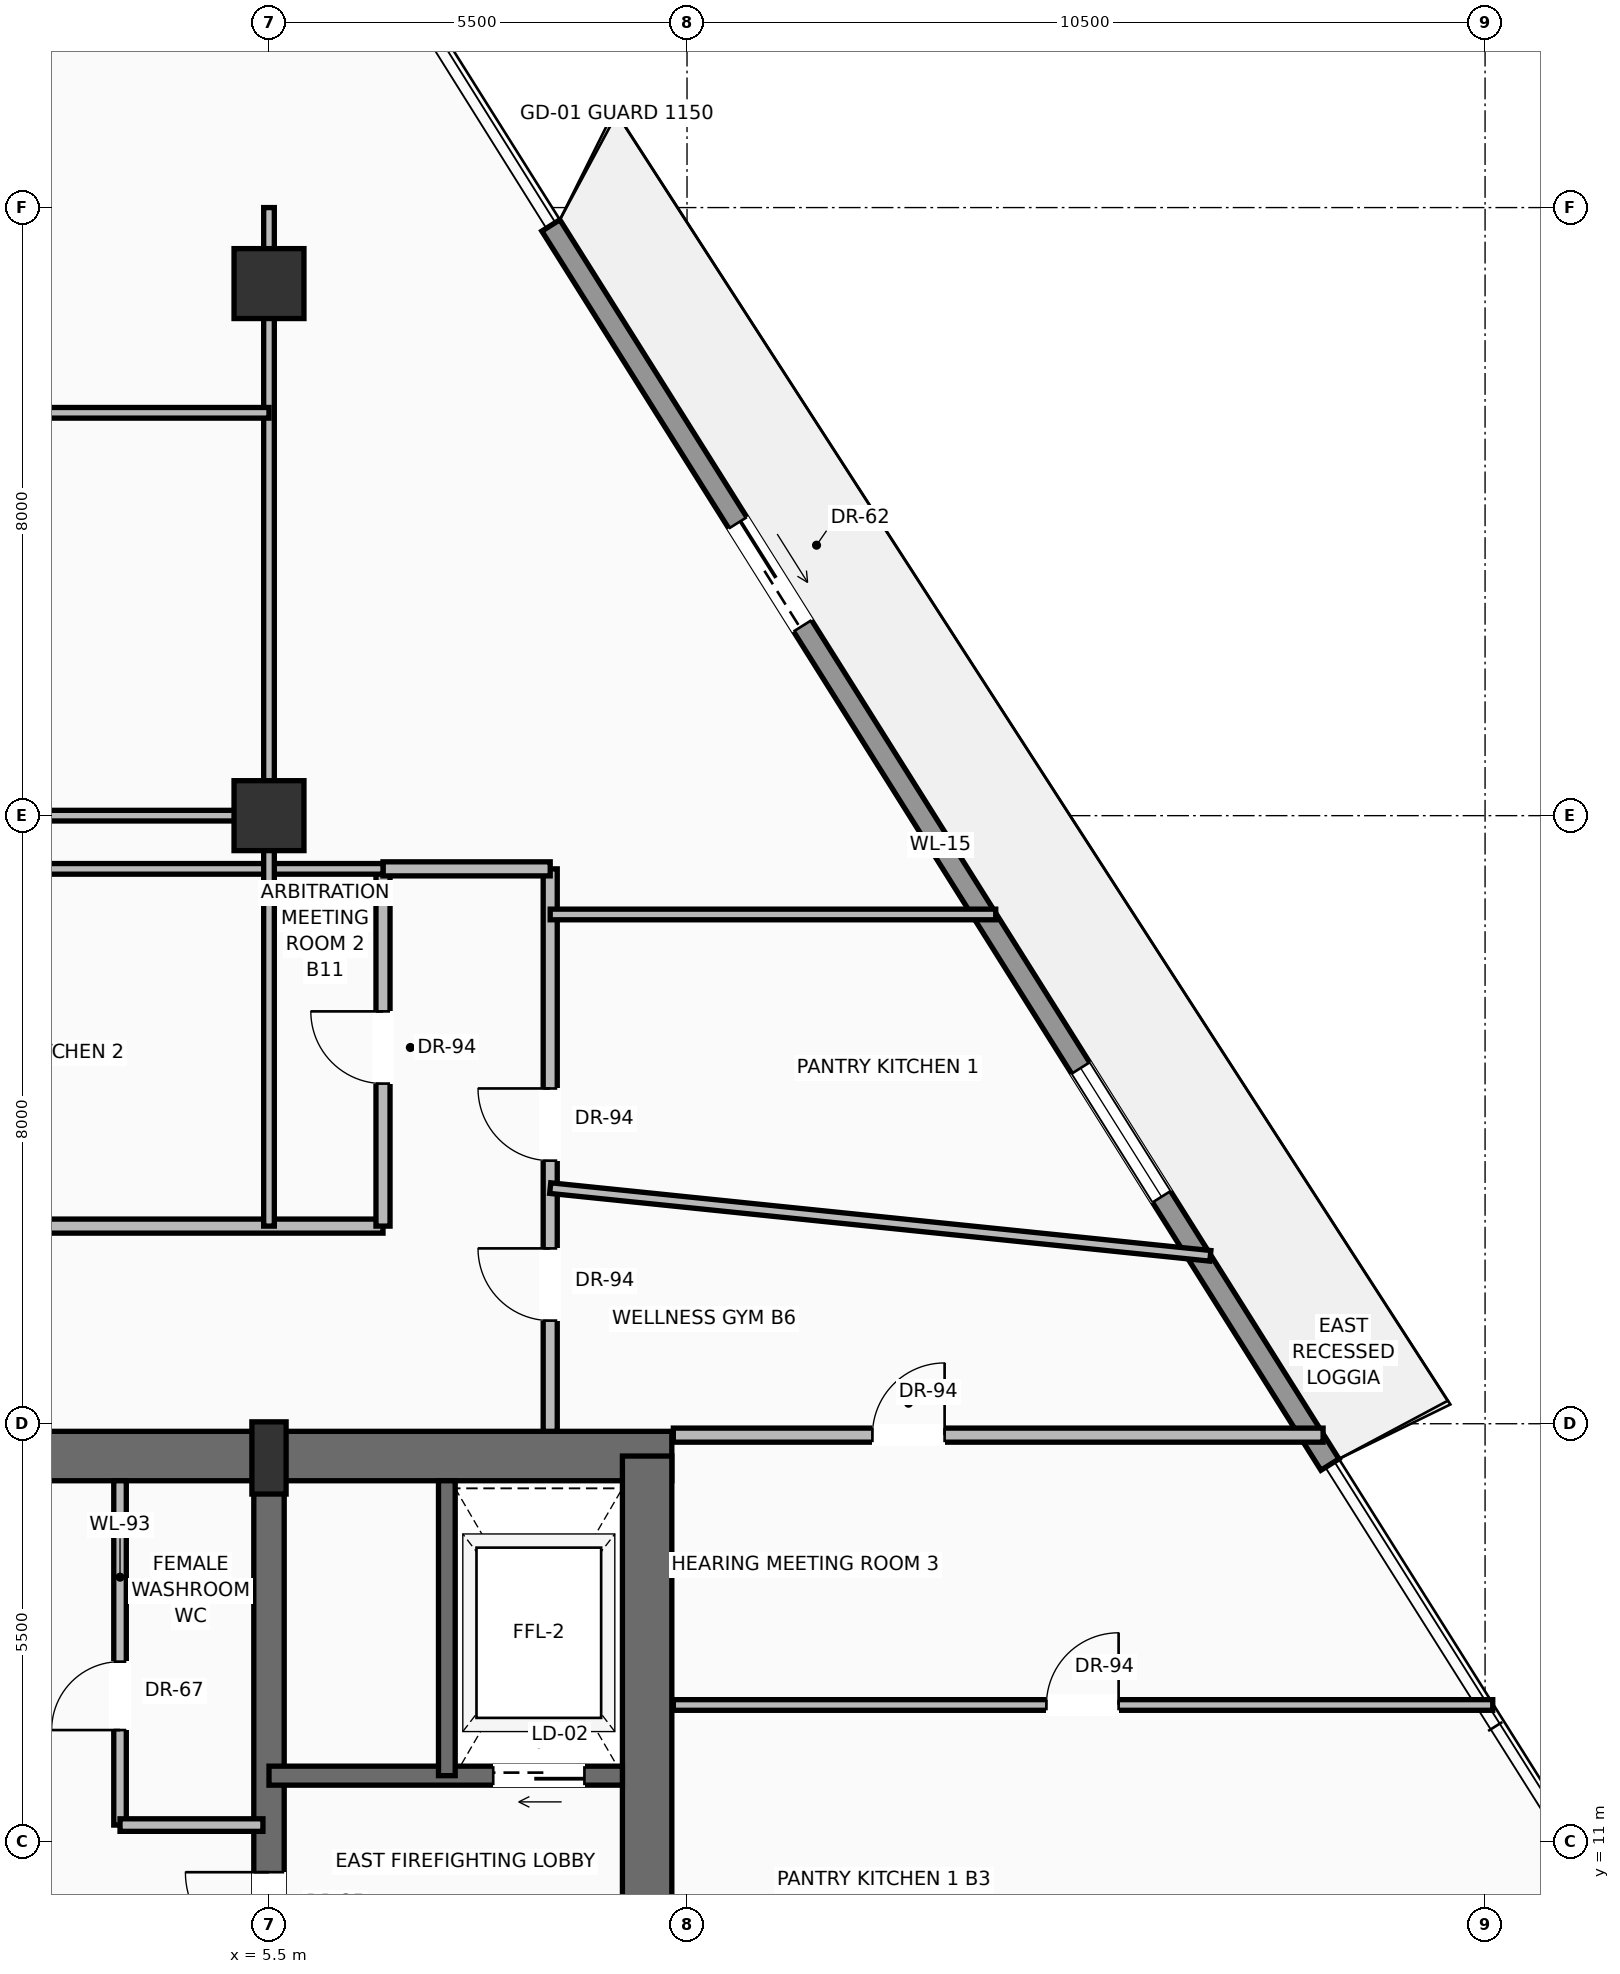
"""IFC4 building model, lengths in metres.
Left out: names, types, materials, properties, quantities, classifications, styles, units other than length and angle.
Written with IfcOpenShell. Run it as: python <this file> out.ifc"""

import sys

from ifc_helpers import new_model, si_unit, direction, frame, frame_2d, origin, origin_2d, place, context, subcontext, project, spatial, rectangle, extrude, source, transform, mapped, element, fill, save


model = new_model("IFC4")
c1 = context("Model", 3, precision=1e-05, world=origin(), true_north=direction((0.0, 1.0)))
c2 = subcontext(c1, "Body", "Model", "MODEL_VIEW")
j1 = project(units=[si_unit("LENGTHUNIT", "METRE"), si_unit("PLANEANGLEUNIT", "RADIAN")], contexts=[c1])
p1 = place(None, origin())
s1 = spatial("IfcSite", under=j1, at=p1, CompositionType="ELEMENT")
p2 = place(p1, origin())
s2 = spatial("IfcBuilding", under=s1, at=p2, CompositionType="ELEMENT")
p3 = place(p2, frame((0.0, 0.0, 211.7)))
s3 = spatial("IfcBuildingStorey", under=s2, at=p3, CompositionType="ELEMENT", Elevation=211.7)
p4 = place(p3, frame((-10.8, 16.075, 0.0), z_axis=(0.0, 0.0, 1.0), x_axis=(1.0, 0.0, 0.0)))
e1 = element("IfcWall", 1, at=p4, inside=s3, PredefinedType="SHEAR", context=c2, shape_type="SweptSolid", body=[
    extrude(rectangle(XDim=21.6, YDim=0.65, at=frame_2d((10.8, 0.0))), origin(), (0.0, 0.0, 1.0), 3.42),
])
p5 = place(p4, frame((3.37, 0.0, 0.0)))
e2 = element("IfcOpeningElement", 2, at=p5, cuts=e1, PredefinedType="OPENING", context=c2, shape_type="SweptSolid", body=[
    extrude(rectangle(XDim=1.3, YDim=2.3, at=frame_2d((0.65, 1.15))), frame((0.0, 0.335, 0.0), z_axis=(0.0, -1.0, 0.0), x_axis=(1.0, 0.0, 0.0)), (0.0, 0.0, 1.0), 0.67),
])
p6 = place(p4, frame((9.8, 0.0, 0.0)))
e3 = element("IfcOpeningElement", 3, at=p6, cuts=e1, PredefinedType="OPENING", context=c2, shape_type="SweptSolid", body=[
    extrude(rectangle(XDim=2.0, YDim=2.4, at=frame_2d((1.0, 1.2))), frame((0.0, 0.335, 0.0), z_axis=(0.0, -1.0, 0.0), x_axis=(1.0, 0.0, 0.0)), (0.0, 0.0, 1.0), 0.67),
])
p7 = place(p3, frame((10.475, 0.525, 0.0), z_axis=(0.0, 0.0, 1.0), x_axis=(0.0, 1.0, 0.0)))
e4 = element("IfcWall", 4, at=p7, inside=s3, PredefinedType="SHEAR", context=c2, shape_type="SweptSolid", body=[
    extrude(rectangle(XDim=15.55, YDim=0.65, at=frame_2d((7.775, 0.0))), origin(), (0.0, 0.0, 1.0), 3.42),
])
p8 = place(p3, frame((5.5, 0.525, 0.0), z_axis=(0.0, 0.0, 1.0), x_axis=(0.0, 1.0, 0.0)))
e5 = element("IfcWall", 5, at=p8, inside=s3, PredefinedType="SHEAR", context=c2, shape_type="SweptSolid", body=[
    extrude(rectangle(XDim=15.55, YDim=0.4, at=frame_2d((7.775, 0.0))), origin(), (0.0, 0.0, 1.0), 3.42),
])
p9 = place(p8, frame((8.975, 0.0, 0.0)))
e6 = element("IfcOpeningElement", 6, at=p9, cuts=e5, PredefinedType="OPENING", context=c2, shape_type="SweptSolid", body=[
    extrude(rectangle(XDim=1.1, YDim=2.2, at=frame_2d((0.55, 1.1))), frame((0.0, 0.21, 0.0), z_axis=(0.0, -1.0, 0.0), x_axis=(1.0, 0.0, 0.0)), (0.0, 0.0, 1.0), 0.42),
])
m1 = source(origin(), c2, "Body", "SweptSolid", [
    extrude(rectangle(XDim=0.45, YDim=0.95, at=origin_2d()), origin(), (0.0, 0.0, 1.0), 3.7),
])
p10 = place(p3, frame((5.5, 16.05, 0.0), z_axis=(0.0, 0.0, 1.0), x_axis=(1.0, 0.0, 0.0)))
e7 = element("IfcColumn", 7, at=p10, inside=s3, PredefinedType="PILASTER", context=c2, shape_type="MappedRepresentation", body=[
    mapped(m1, transform((0.0, 0.0, 0.0), scale=1.0)),
])
m2 = source(origin(), c2, "Body", "SweptSolid", [
    extrude(rectangle(XDim=0.92, YDim=0.92, at=origin_2d()), origin(), (0.0, 0.0, 1.0), 3.7),
])
for number, where, z_axis, x_axis in (
    (8, (5.5, 24.5, 0.0), (0.0, 0.0, 1.0), (1.0, 0.0, 0.0)),
    (9, (5.5, 31.5, 0.0), (0.0, 0.0, 1.0), (1.0, 0.0, 0.0)),
):
    element("IfcColumn", number, at=place(p3, frame(where, z_axis=z_axis, x_axis=x_axis)), inside=s3, PredefinedType="COLUMN", context=c2, shape_type="MappedRepresentation", body=[
        mapped(m2, transform((0.0, 0.0, 0.0), scale=1.0)),
    ])
p11 = place(p3, frame((9.208, 32.265, 0.0), z_axis=(0.0, 0.0, 1.0), x_axis=(0.532287601055, -0.84656358873, 0.0)))
e10 = element("IfcWall", 10, at=p11, inside=s3, PredefinedType="SOLIDWALL", context=c2, shape_type="SweptSolid", body=[
    extrude(rectangle(XDim=19.257, YDim=0.28, at=frame_2d((9.628, 0.0))), origin(), (0.0, 0.0, 1.0), 3.0),
])
p12 = place(p11, frame((4.622, 0.0, 0.0)))
e11 = element("IfcOpeningElement", 11, at=p12, cuts=e10, PredefinedType="OPENING", context=c2, shape_type="SweptSolid", body=[
    extrude(rectangle(XDim=1.6, YDim=2.35, at=frame_2d((0.8, 1.175))), frame((0.0, 0.15, 0.0), z_axis=(0.0, -1.0, 0.0), x_axis=(1.0, 0.0, 0.0)), (0.0, 0.0, 1.0), 0.3),
])
p13 = place(p11, frame((13.095, 0.0, 0.9)))
e12 = element("IfcOpeningElement", 12, at=p13, cuts=e10, PredefinedType="OPENING", context=c2, shape_type="SweptSolid", body=[
    extrude(rectangle(XDim=2.0, YDim=1.85, at=frame_2d((1.0, 0.925))), frame((0.0, 0.15, 0.0), z_axis=(0.0, -1.0, 0.0), x_axis=(1.0, 0.0, 0.0)), (0.0, 0.0, 1.0), 0.3),
])
p14 = place(p3, frame((10.15, 11.87, 0.0), z_axis=(0.0, 0.0, 1.0), x_axis=(-1.0, 0.0, 0.0)))
e13 = element("IfcWall", 13, at=p14, inside=s3, PredefinedType="SOLIDWALL", context=c2, shape_type="SweptSolid", body=[
    extrude(rectangle(XDim=4.65, YDim=0.25, at=frame_2d((2.325, 0.0))), origin(), (0.0, 0.0, 1.0), 3.42),
])
p15 = place(p14, frame((0.5, 0.0, 0.0)))
e14 = element("IfcOpeningElement", 14, at=p15, cuts=e13, PredefinedType="OPENING", context=c2, shape_type="SweptSolid", body=[
    extrude(rectangle(XDim=1.2, YDim=2.25, at=frame_2d((0.6, 1.125))), frame((0.0, 0.135, 0.0), z_axis=(0.0, -1.0, 0.0), x_axis=(1.0, 0.0, 0.0)), (0.0, 0.0, 1.0), 0.27),
])
p16 = place(p3, frame((7.84, 11.87, 0.0), z_axis=(0.0, 0.0, 1.0), x_axis=(0.0, 1.0, 0.0)))
e15 = element("IfcWall", 15, at=p16, inside=s3, PredefinedType="SOLIDWALL", context=c2, shape_type="SweptSolid", body=[
    extrude(rectangle(XDim=3.88, YDim=0.22, at=frame_2d((1.94, 0.0))), origin(), (0.0, 0.0, 1.0), 3.42),
])
p17 = place(p3, frame((3.54, 11.22, 0.0), z_axis=(0.0, 0.0, 1.0), x_axis=(0.0, 1.0, 0.0)))
e16 = element("IfcWall", 16, at=p17, inside=s3, PredefinedType="PARTITIONING", context=c2, shape_type="SweptSolid", body=[
    extrude(rectangle(XDim=4.53, YDim=0.165, at=frame_2d((2.265, 0.0))), origin(), (0.0, 0.0, 1.0), 3.412),
])
p18 = place(p17, frame((1.25, 0.0, 0.0)))
e17 = element("IfcOpeningElement", 17, at=p18, cuts=e16, PredefinedType="OPENING", context=c2, shape_type="SweptSolid", body=[
    extrude(rectangle(XDim=0.9, YDim=2.1, at=frame_2d((0.45, 1.05))), frame((0.0, 0.093, 0.0), z_axis=(0.0, -1.0, 0.0), x_axis=(1.0, 0.0, 0.0)), (0.0, 0.0, 1.0), 0.185),
])
p19 = place(p3, frame((3.54, 11.22, 0.0), z_axis=(0.0, 0.0, 1.0), x_axis=(1.0, 0.0, 0.0)))
e18 = element("IfcWall", 18, at=p19, inside=s3, PredefinedType="PARTITIONING", context=c2, shape_type="SweptSolid", body=[
    extrude(rectangle(XDim=1.88, YDim=0.165, at=frame_2d((0.94, 0.0))), origin(), (0.0, 0.0, 1.0), 3.412),
])
p20 = place(p3, frame((-7.0, 19.1, 0.0), z_axis=(0.0, 0.0, 1.0), x_axis=(1.0, 0.0, 0.0)))
e19 = element("IfcWall", 19, at=p20, inside=s3, PredefinedType="PARTITIONING", context=c2, shape_type="SweptSolid", body=[
    extrude(rectangle(XDim=14.0, YDim=0.185, at=frame_2d((7.0, 0.0))), origin(), (0.0, 0.0, 1.0), 2.796),
])
p21 = place(p20, frame((6.525, 0.0, 0.0)))
e20 = element("IfcOpeningElement", 20, at=p21, cuts=e19, PredefinedType="OPENING", context=c2, shape_type="SweptSolid", body=[
    extrude(rectangle(XDim=0.95, YDim=2.2, at=frame_2d((0.475, 1.1))), frame((0.0, 0.103, 0.0), z_axis=(0.0, -1.0, 0.0), x_axis=(1.0, 0.0, 0.0)), (0.0, 0.0, 1.0), 0.205),
])
p22 = place(p3, frame((7.0, 19.1, 0.0), z_axis=(0.0, 0.0, 1.0), x_axis=(0.0, 1.0, 0.0)))
e21 = element("IfcWall", 21, at=p22, inside=s3, PredefinedType="PARTITIONING", context=c2, shape_type="SweptSolid", body=[
    extrude(rectangle(XDim=4.7, YDim=0.185, at=frame_2d((2.35, 0.0))), origin(), (0.0, 0.0, 1.0), 3.412),
])
p23 = place(p22, frame((1.875, 0.0, 0.0)))
e22 = element("IfcOpeningElement", 22, at=p23, cuts=e21, PredefinedType="OPENING", context=c2, shape_type="SweptSolid", body=[
    extrude(rectangle(XDim=0.95, YDim=2.2, at=frame_2d((0.475, 1.1))), frame((0.0, 0.103, 0.0), z_axis=(0.0, -1.0, 0.0), x_axis=(1.0, 0.0, 0.0)), (0.0, 0.0, 1.0), 0.205),
])
p24 = place(p3, frame((9.2, 16.4, 0.0), z_axis=(0.0, 0.0, 1.0), x_axis=(0.0, 1.0, 0.0)))
e23 = element("IfcWall", 23, at=p24, inside=s3, PredefinedType="PARTITIONING", context=c2, shape_type="SweptSolid", body=[
    extrude(rectangle(XDim=7.4, YDim=0.185, at=frame_2d((3.7, 0.0))), origin(), (0.0, 0.0, 1.0), 3.412),
])
p25 = place(p24, frame((3.561, 0.0, 0.0)))
e24 = element("IfcOpeningElement", 24, at=p25, cuts=e23, PredefinedType="OPENING", context=c2, shape_type="SweptSolid", body=[
    extrude(rectangle(XDim=0.95, YDim=2.2, at=frame_2d((0.475, 1.1))), frame((0.0, 0.103, 0.0), z_axis=(0.0, -1.0, 0.0), x_axis=(1.0, 0.0, 0.0)), (0.0, 0.0, 1.0), 0.205),
])
p26 = place(p24, frame((1.457, 0.0, 0.0)))
e25 = element("IfcOpeningElement", 25, at=p26, cuts=e23, PredefinedType="OPENING", context=c2, shape_type="SweptSolid", body=[
    extrude(rectangle(XDim=0.95, YDim=2.2, at=frame_2d((0.475, 1.1))), frame((0.0, 0.103, 0.0), z_axis=(0.0, -1.0, 0.0), x_axis=(1.0, 0.0, 0.0)), (0.0, 0.0, 1.0), 0.205),
])
p27 = place(p3, frame((7.0, 23.8, 0.0), z_axis=(0.0, 0.0, 1.0), x_axis=(1.0, 0.0, 0.0)))
e26 = element("IfcWall", 26, at=p27, inside=s3, PredefinedType="PARTITIONING", context=c2, shape_type="SweptSolid", body=[
    extrude(rectangle(XDim=2.2, YDim=0.185, at=frame_2d((1.1, 0.0))), origin(), (0.0, 0.0, 1.0), 3.412),
])
p28 = place(p3, frame((10.82, 16.35, 0.0), z_axis=(0.0, 0.0, 1.0), x_axis=(1.0, 0.0, 0.0)))
e27 = element("IfcWall", 27, at=p28, inside=s3, PredefinedType="PARTITIONING", context=c2, shape_type="SweptSolid", body=[
    extrude(rectangle(XDim=8.549, YDim=0.185, at=frame_2d((4.274, 0.0))), origin(), (0.0, 0.0, 1.0), 3.412),
])
p29 = place(p28, frame((2.619, 0.0, 0.0)))
e28 = element("IfcOpeningElement", 28, at=p29, cuts=e27, PredefinedType="OPENING", context=c2, shape_type="SweptSolid", body=[
    extrude(rectangle(XDim=0.95, YDim=2.2, at=frame_2d((0.475, 1.1))), frame((0.0, 0.103, 0.0), z_axis=(0.0, -1.0, 0.0), x_axis=(1.0, 0.0, 0.0)), (0.0, 0.0, 1.0), 0.205),
])
p30 = place(p3, frame((-7.0, 23.8, 0.0), z_axis=(0.0, 0.0, 1.0), x_axis=(1.0, 0.0, 0.0)))
e29 = element("IfcWall", 29, at=p30, inside=s3, PredefinedType="PARTITIONING", context=c2, shape_type="SweptSolid", body=[
    extrude(rectangle(XDim=14.0, YDim=0.14, at=frame_2d((7.0, 0.0))), origin(), (0.0, 0.0, 1.0), 3.412),
])
p31 = place(p3, frame((5.5, 19.1, 0.0), z_axis=(0.0, 0.0, 1.0), x_axis=(0.0, 1.0, 0.0)))
e30 = element("IfcWall", 30, at=p31, inside=s3, PredefinedType="PARTITIONING", context=c2, shape_type="SweptSolid", body=[
    extrude(rectangle(XDim=13.4, YDim=0.14, at=frame_2d((6.7, 0.0))), origin(), (0.0, 0.0, 1.0), 2.796),
])
p32 = place(p3, frame((-5.5, 24.5, 0.0), z_axis=(0.0, 0.0, 1.0), x_axis=(1.0, 0.0, 0.0)))
e31 = element("IfcWall", 31, at=p32, inside=s3, PredefinedType="PARTITIONING", context=c2, shape_type="SweptSolid", body=[
    extrude(rectangle(XDim=11.0, YDim=0.14, at=frame_2d((5.5, 0.0))), origin(), (0.0, 0.0, 1.0), 2.796),
])
p33 = place(p3, frame((-5.5, 29.8, 0.0), z_axis=(0.0, 0.0, 1.0), x_axis=(1.0, 0.0, 0.0)))
e32 = element("IfcWall", 32, at=p33, inside=s3, PredefinedType="PARTITIONING", context=c2, shape_type="SweptSolid", body=[
    extrude(rectangle(XDim=11.0, YDim=0.14, at=frame_2d((5.5, 0.0))), origin(), (0.0, 0.0, 1.0), 3.412),
])
p34 = place(p3, frame((10.82, 12.8, 0.0), z_axis=(0.0, 0.0, 1.0), x_axis=(1.0, 0.0, 0.0)))
e33 = element("IfcWall", 33, at=p34, inside=s3, PredefinedType="PARTITIONING", context=c2, shape_type="SweptSolid", body=[
    extrude(rectangle(XDim=10.781, YDim=0.14, at=frame_2d((5.391, 0.0))), origin(), (0.0, 0.0, 1.0), 3.412),
])
p35 = place(p34, frame((4.908, 0.0, 0.0)))
e34 = element("IfcOpeningElement", 34, at=p35, cuts=e33, PredefinedType="OPENING", context=c2, shape_type="SweptSolid", body=[
    extrude(rectangle(XDim=0.95, YDim=2.2, at=frame_2d((0.475, 1.1))), frame((0.0, 0.08, 0.0), z_axis=(0.0, -1.0, 0.0), x_axis=(1.0, 0.0, 0.0)), (0.0, 0.0, 1.0), 0.16),
])
p36 = place(p3, frame((9.2, 19.6, 0.0), z_axis=(0.0, 0.0, 1.0), x_axis=(0.994778090634, -0.102061503002, 0.0)))
e35 = element("IfcWall", 35, at=p36, inside=s3, PredefinedType="PARTITIONING", context=c2, shape_type="SweptSolid", body=[
    extrude(rectangle(XDim=8.731, YDim=0.14, at=frame_2d((4.366, 0.0))), origin(), (0.0, 0.0, 1.0), 2.999),
])
p37 = place(p3, frame((9.2, 23.2, 0.0), z_axis=(0.0, 0.0, 1.0), x_axis=(1.0, 0.0, 0.0)))
e36 = element("IfcWall", 36, at=p37, inside=s3, PredefinedType="PARTITIONING", context=c2, shape_type="SweptSolid", body=[
    extrude(rectangle(XDim=5.862, YDim=0.14, at=frame_2d((2.931, 0.0))), origin(), (0.0, 0.0, 1.0), 3.412),
])
m3 = source(origin(), c2, "Body", "SweptSolid", [
    extrude(rectangle(XDim=1.6, YDim=2.35, at=frame_2d((0.8, 1.175))), frame((0.0, 0.025, 0.0), z_axis=(0.0, -1.0, 0.0), x_axis=(1.0, 0.0, 0.0)), (0.0, 0.0, 1.0), 0.05),
])
p38 = place(p12, origin())
e37 = element("IfcDoor", 37, at=p38, inside=s3, OperationType="SLIDING_TO_RIGHT", PredefinedType="DOOR", context=c2, shape_type="MappedRepresentation", body=[
    mapped(m3, transform((0.0, 0.0, 0.0), scale=1.0)),
])
fill(e11, e37)
m4 = source(origin(), c2, "Body", "SweptSolid", [
    extrude(rectangle(XDim=2.0, YDim=1.85, at=frame_2d((1.0, 0.925))), frame((0.0, 0.03, 0.0), z_axis=(0.0, -1.0, 0.0), x_axis=(1.0, 0.0, 0.0)), (0.0, 0.0, 1.0), 0.06),
])
p39 = place(p13, origin())
e38 = element("IfcWindow", 38, at=p39, inside=s3, PartitioningType="SINGLE_PANEL", PredefinedType="WINDOW", context=c2, shape_type="MappedRepresentation", body=[
    mapped(m4, transform((0.0, 0.0, 0.0), scale=1.0)),
])
fill(e12, e38)
m5 = source(origin(), c2, "Body", "SweptSolid", [
    extrude(rectangle(XDim=1.1, YDim=2.2, at=frame_2d((0.55, 1.1))), frame((0.0, 0.025, 0.0), z_axis=(0.0, -1.0, 0.0), x_axis=(1.0, 0.0, 0.0)), (0.0, 0.0, 1.0), 0.05),
])
p40 = place(p9, origin())
e39 = element("IfcDoor", 39, at=p40, inside=s3, OperationType="SINGLE_SWING_RIGHT", PredefinedType="DOOR", context=c2, shape_type="MappedRepresentation", body=[
    mapped(m5, transform((0.0, 0.0, 0.0), scale=1.0)),
])
fill(e6, e39)
m6 = source(origin(), c2, "Body", "SweptSolid", [
    extrude(rectangle(XDim=1.2, YDim=2.25, at=frame_2d((0.6, 1.125))), frame((0.0, 0.025, 0.0), z_axis=(0.0, -1.0, 0.0), x_axis=(1.0, 0.0, 0.0)), (0.0, 0.0, 1.0), 0.05),
])
p41 = place(p15, origin())
e40 = element("IfcDoor", 40, at=p41, inside=s3, OperationType="SLIDING_TO_RIGHT", PredefinedType="DOOR", context=c2, shape_type="MappedRepresentation", body=[
    mapped(m6, transform((0.0, 0.0, 0.0), scale=1.0)),
])
fill(e14, e40)
m7 = source(origin(), c2, "Body", "SweptSolid", [
    extrude(rectangle(XDim=0.9, YDim=2.1, at=frame_2d((0.45, 1.05))), frame((0.0, 0.025, 0.0), z_axis=(0.0, -1.0, 0.0), x_axis=(1.0, 0.0, 0.0)), (0.0, 0.0, 1.0), 0.05),
])
p42 = place(p18, origin())
e41 = element("IfcDoor", 41, at=p42, inside=s3, OperationType="SINGLE_SWING_LEFT", PredefinedType="DOOR", context=c2, shape_type="MappedRepresentation", body=[
    mapped(m7, transform((0.0, 0.0, 0.0), scale=1.0)),
])
fill(e17, e41)
m8 = source(origin(), c2, "Body", "SweptSolid", [
    extrude(rectangle(XDim=0.95, YDim=2.2, at=frame_2d((0.475, 1.1))), frame((0.0, 0.025, 0.0), z_axis=(0.0, -1.0, 0.0), x_axis=(1.0, 0.0, 0.0)), (0.0, 0.0, 1.0), 0.05),
])
p43 = place(p25, origin())
e42 = element("IfcDoor", 42, at=p43, inside=s3, OperationType="SINGLE_SWING_RIGHT", PredefinedType="DOOR", context=c2, shape_type="MappedRepresentation", body=[
    mapped(m8, transform((0.0, 0.0, 0.0), scale=1.0)),
])
fill(e24, e42)
p44 = place(p29, origin())
e43 = element("IfcDoor", 43, at=p44, inside=s3, OperationType="SINGLE_SWING_RIGHT", PredefinedType="DOOR", context=c2, shape_type="MappedRepresentation", body=[
    mapped(m8, transform((0.0, 0.0, 0.0), scale=1.0)),
])
fill(e28, e43)
p45 = place(p26, origin())
e44 = element("IfcDoor", 44, at=p45, inside=s3, OperationType="SINGLE_SWING_RIGHT", PredefinedType="DOOR", context=c2, shape_type="MappedRepresentation", body=[
    mapped(m8, transform((0.0, 0.0, 0.0), scale=1.0)),
])
fill(e25, e44)
p46 = place(p23, origin())
e45 = element("IfcDoor", 45, at=p46, inside=s3, OperationType="SINGLE_SWING_RIGHT", PredefinedType="DOOR", context=c2, shape_type="MappedRepresentation", body=[
    mapped(m8, transform((0.0, 0.0, 0.0), scale=1.0)),
])
fill(e22, e45)
p47 = place(p35, origin())
e46 = element("IfcDoor", 46, at=p47, inside=s3, OperationType="SINGLE_SWING_RIGHT", PredefinedType="DOOR", context=c2, shape_type="MappedRepresentation", body=[
    mapped(m8, transform((0.0, 0.0, 0.0), scale=1.0)),
])
fill(e34, e46)
save(model, sys.argv[1])
